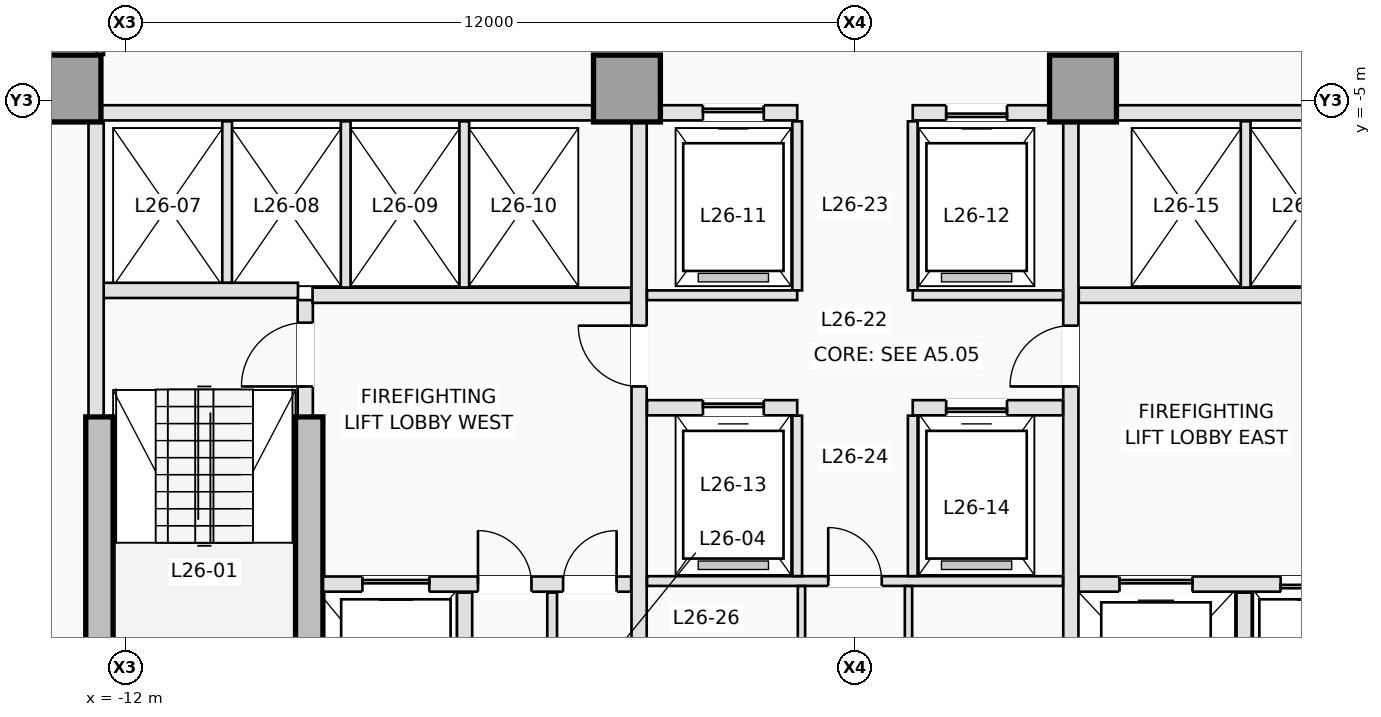
"""IFC4 building model, lengths in metres.
Left out: names, types, materials, properties, quantities, classifications, styles, units other than length and angle.
Written with IfcOpenShell. Run it as: python <this file> out.ifc"""

import sys

from ifc_helpers import new_model, si_unit, direction, frame, frame_2d, origin, origin_2d, place, context, subcontext, project, spatial, rectangle, extrude, element, fill, save


model = new_model("IFC4")
c1 = context("Model", 3, precision=1e-05, world=origin(), true_north=direction((0.0, 1.0)))
c2 = subcontext(c1, "Body", "Model", "MODEL_VIEW")
j1 = project(units=[si_unit("LENGTHUNIT", "METRE"), si_unit("PLANEANGLEUNIT", "RADIAN")], contexts=[c1])
p1 = place(None, origin())
s1 = spatial("IfcSite", under=j1, at=p1, CompositionType="ELEMENT")
p2 = place(p1, origin())
s2 = spatial("IfcBuilding", under=s1, at=p2, CompositionType="ELEMENT")
p3 = place(p2, frame((0.0, 0.0, 98.5)))
s3 = spatial("IfcBuildingStorey", under=s2, at=p3, CompositionType="ELEMENT", Elevation=98.5)
p4 = place(p3, frame((-12.425, -15.725, 0.0), z_axis=(0.0, 0.0, 1.0), x_axis=(0.0, 1.0, 0.0)))
e1 = element("IfcWall", 1, at=p4, inside=s3, PredefinedType="SHEAR", context=c2, shape_type="SweptSolid", body=[
    extrude(rectangle(XDim=5.525, YDim=0.45, at=frame_2d((2.763, 0.0))), origin(), (0.0, 0.0, 1.0), 3.5),
])
p5 = place(p3, frame((-8.975, -16.15, 0.0), z_axis=(0.0, 0.0, 1.0), x_axis=(0.0, 1.0, 0.0)))
e2 = element("IfcWall", 2, at=p5, inside=s3, PredefinedType="SHEAR", context=c2, shape_type="SweptSolid", body=[
    extrude(rectangle(XDim=5.95, YDim=0.45, at=frame_2d((2.975, 0.0))), origin(), (0.0, 0.0, 1.0), 3.5),
])
for number, where, z_axis, x_axis in (
    (3, (-12.95, -4.8, 0.0), (0.0, 0.0, 1.0), (1.0, 0.0, 0.0)),
    (4, (-3.75, -4.8, 0.0), (0.0, 0.0, 1.0), (1.0, 0.0, 0.0)),
    (5, (3.75, -4.8, 0.0), (0.0, 0.0, 1.0), (1.0, 0.0, 0.0)),
):
    element("IfcColumn", number, at=place(p3, frame(where, z_axis=z_axis, x_axis=x_axis)), inside=s3, PredefinedType="COLUMN", context=c2, shape_type="SweptSolid", body=[
        extrude(rectangle(XDim=1.1, YDim=1.1, at=origin_2d()), origin(), (0.0, 0.0, 1.0), 3.5),
    ])
p6 = place(p3, frame((-9.04, -10.18, 0.0), z_axis=(0.0, 0.0, 1.0), x_axis=(0.0, 1.0, 0.0)))
e6 = element("IfcWall", 6, at=p6, inside=s3, PredefinedType="PARTITIONING", context=c2, shape_type="SweptSolid", body=[
    extrude(rectangle(XDim=1.9, YDim=0.25, at=frame_2d((0.95, 0.0))), origin(), (0.0, 0.0, 1.0), 3.25),
])
p7 = place(p6, frame((0.48, 0.0, 0.0)))
e7 = element("IfcOpeningElement", 7, at=p7, cuts=e6, PredefinedType="OPENING", context=c2, shape_type="SweptSolid", body=[
    extrude(rectangle(XDim=1.05, YDim=2.15, at=frame_2d((0.525, 1.075))), frame((0.0, 0.135, 0.0), z_axis=(0.0, -1.0, 0.0), x_axis=(1.0, 0.0, 0.0)), (0.0, 0.0, 1.0), 0.27),
])
p8 = place(p3, frame((-12.38, -8.12, 0.0), z_axis=(0.0, 0.0, 1.0), x_axis=(1.0, 0.0, 0.0)))
e8 = element("IfcWall", 8, at=p8, inside=s3, PredefinedType="PARTITIONING", context=c2, shape_type="SweptSolid", body=[
    extrude(rectangle(XDim=3.22, YDim=0.25, at=frame_2d((1.61, 0.0))), origin(), (0.0, 0.0, 1.0), 3.25),
])
p9 = place(p3, frame((-12.48, -10.18, 0.0), z_axis=(0.0, 0.0, 1.0), x_axis=(0.0, 1.0, 0.0)))
e9 = element("IfcWall", 9, at=p9, inside=s3, PredefinedType="PARTITIONING", context=c2, shape_type="SweptSolid", body=[
    extrude(rectangle(XDim=4.828, YDim=0.25, at=frame_2d((2.414, 0.0))), origin(), (0.0, 0.0, 1.0), 3.25),
])
p10 = place(p3, frame((-8.748, -12.95, 0.0), z_axis=(0.0, 0.0, 1.0), x_axis=(1.0, 0.0, 0.0)))
e10 = element("IfcWall", 10, at=p10, inside=s3, PredefinedType="PARTITIONING", context=c2, shape_type="SweptSolid", body=[
    extrude(rectangle(XDim=5.068, YDim=0.25, at=frame_2d((2.534, 0.0))), origin(), (0.0, 0.0, 1.0), 3.25),
])
p11 = place(p10, frame((0.648, 0.0, 0.0)))
e11 = element("IfcOpeningElement", 11, at=p11, cuts=e10, PredefinedType="OPENING", context=c2, shape_type="SweptSolid", body=[
    extrude(rectangle(XDim=1.1, YDim=2.15, at=frame_2d((0.55, 1.075))), frame((0.0, 0.135, 0.0), z_axis=(0.0, -1.0, 0.0), x_axis=(1.0, 0.0, 0.0)), (0.0, 0.0, 1.0), 0.27),
])
p12 = place(p10, frame((2.548, 0.0, 0.0)))
e12 = element("IfcOpeningElement", 12, at=p12, cuts=e10, PredefinedType="OPENING", context=c2, shape_type="SweptSolid", body=[
    extrude(rectangle(XDim=0.88, YDim=2.1, at=frame_2d((0.44, 1.05))), frame((0.0, 0.135, 0.0), z_axis=(0.0, -1.0, 0.0), x_axis=(1.0, 0.0, 0.0)), (0.0, 0.0, 1.0), 0.27),
])
p13 = place(p10, frame((3.948, 0.0, 0.0)))
e13 = element("IfcOpeningElement", 13, at=p13, cuts=e10, PredefinedType="OPENING", context=c2, shape_type="SweptSolid", body=[
    extrude(rectangle(XDim=0.88, YDim=2.1, at=frame_2d((0.44, 1.05))), frame((0.0, 0.135, 0.0), z_axis=(0.0, -1.0, 0.0), x_axis=(1.0, 0.0, 0.0)), (0.0, 0.0, 1.0), 0.27),
])
p14 = place(p3, frame((3.68, -12.95, 0.0), z_axis=(0.0, 0.0, 1.0), x_axis=(1.0, 0.0, 0.0)))
e14 = element("IfcWall", 14, at=p14, inside=s3, PredefinedType="PARTITIONING", context=c2, shape_type="SweptSolid", body=[
    extrude(rectangle(XDim=5.068, YDim=0.25, at=frame_2d((2.534, 0.0))), origin(), (0.0, 0.0, 1.0), 3.25),
])
p15 = place(p14, frame((3.32, 0.0, 0.0)))
e15 = element("IfcOpeningElement", 15, at=p15, cuts=e14, PredefinedType="OPENING", context=c2, shape_type="SweptSolid", body=[
    extrude(rectangle(XDim=1.1, YDim=2.15, at=frame_2d((0.55, 1.075))), frame((0.0, 0.135, 0.0), z_axis=(0.0, -1.0, 0.0), x_axis=(1.0, 0.0, 0.0)), (0.0, 0.0, 1.0), 0.27),
])
p16 = place(p14, frame((0.67, 0.0, 0.0)))
e16 = element("IfcOpeningElement", 16, at=p16, cuts=e14, PredefinedType="OPENING", context=c2, shape_type="SweptSolid", body=[
    extrude(rectangle(XDim=1.2, YDim=2.15, at=frame_2d((0.6, 1.075))), frame((0.0, 0.135, 0.0), z_axis=(0.0, -1.0, 0.0), x_axis=(1.0, 0.0, 0.0)), (0.0, 0.0, 1.0), 0.27),
])
p17 = place(p3, frame((-6.42, -15.92, 0.0), z_axis=(0.0, 0.0, 1.0), x_axis=(0.0, 1.0, 0.0)))
e17 = element("IfcWall", 17, at=p17, inside=s3, PredefinedType="PARTITIONING", context=c2, shape_type="SweptSolid", body=[
    extrude(rectangle(XDim=2.83, YDim=0.25, at=frame_2d((1.415, 0.0))), origin(), (0.0, 0.0, 1.0), 3.25),
])
p18 = place(p3, frame((-4.98, -15.92, 0.0), z_axis=(0.0, 0.0, 1.0), x_axis=(0.0, 1.0, 0.0)))
e18 = element("IfcWall", 18, at=p18, inside=s3, PredefinedType="PARTITIONING", context=c2, shape_type="SweptSolid", body=[
    extrude(rectangle(XDim=2.83, YDim=0.16, at=frame_2d((1.415, 0.0))), origin(), (0.0, 0.0, 1.0), 3.25),
])
p19 = place(p3, frame((6.4, -15.92, 0.0), z_axis=(0.0, 0.0, 1.0), x_axis=(0.0, 1.0, 0.0)))
e19 = element("IfcWall", 19, at=p19, inside=s3, PredefinedType="PARTITIONING", context=c2, shape_type="SweptSolid", body=[
    extrude(rectangle(XDim=2.83, YDim=0.25, at=frame_2d((1.415, 0.0))), origin(), (0.0, 0.0, 1.0), 3.25),
])
for number, where, z_axis, x_axis in (
    (20, (-8.92, -8.2, 0.0), (0.0, 0.0, 1.0), (1.0, 0.0, 0.0)),
    (21, (3.68, -8.2, 0.0), (0.0, 0.0, 1.0), (1.0, 0.0, 0.0)),
):
    element("IfcWall", number, at=place(p3, frame(where, z_axis=z_axis, x_axis=x_axis)), inside=s3, PredefinedType="PARTITIONING", context=c2, shape_type="SweptSolid", body=[
        extrude(rectangle(XDim=5.24, YDim=0.25, at=frame_2d((2.62, 0.0))), origin(), (0.0, 0.0, 1.0), 3.25),
    ])
p20 = place(p3, frame((-3.55, -15.798, 0.0), z_axis=(0.0, 0.0, 1.0), x_axis=(0.0, 1.0, 0.0)))
e22 = element("IfcWall", 22, at=p20, inside=s3, PredefinedType="PARTITIONING", context=c2, shape_type="SweptSolid", body=[
    extrude(rectangle(XDim=10.446, YDim=0.25, at=frame_2d((5.223, 0.0))), origin(), (0.0, 0.0, 1.0), 3.25),
])
p21 = place(p20, frame((6.098, 0.0, 0.0)))
e23 = element("IfcOpeningElement", 23, at=p21, cuts=e22, PredefinedType="OPENING", context=c2, shape_type="SweptSolid", body=[
    extrude(rectangle(XDim=1.0, YDim=2.15, at=frame_2d((0.5, 1.075))), frame((0.0, 0.135, 0.0), z_axis=(0.0, -1.0, 0.0), x_axis=(1.0, 0.0, 0.0)), (0.0, 0.0, 1.0), 0.27),
])
p22 = place(p3, frame((3.55, -15.798, 0.0), z_axis=(0.0, 0.0, 1.0), x_axis=(0.0, 1.0, 0.0)))
e24 = element("IfcWall", 24, at=p22, inside=s3, PredefinedType="PARTITIONING", context=c2, shape_type="SweptSolid", body=[
    extrude(rectangle(XDim=10.446, YDim=0.25, at=frame_2d((5.223, 0.0))), origin(), (0.0, 0.0, 1.0), 3.25),
])
p23 = place(p22, frame((6.098, 0.0, 0.0)))
e25 = element("IfcOpeningElement", 25, at=p23, cuts=e24, PredefinedType="OPENING", context=c2, shape_type="SweptSolid", body=[
    extrude(rectangle(XDim=1.0, YDim=2.15, at=frame_2d((0.5, 1.075))), frame((0.0, 0.135, 0.0), z_axis=(0.0, -1.0, 0.0), x_axis=(1.0, 0.0, 0.0)), (0.0, 0.0, 1.0), 0.27),
])
for number, where, z_axis, x_axis in (
    (26, (-12.398, -5.2, 0.0), (0.0, 0.0, 1.0), (1.0, 0.0, 0.0)),
    (27, (4.302, -5.2, 0.0), (0.0, 0.0, 1.0), (1.0, 0.0, 0.0)),
):
    element("IfcWall", number, at=place(p3, frame(where, z_axis=z_axis, x_axis=x_axis)), inside=s3, PredefinedType="PARTITIONING", context=c2, shape_type="SweptSolid", body=[
        extrude(rectangle(XDim=8.096, YDim=0.25, at=frame_2d((4.048, 0.0))), origin(), (0.0, 0.0, 1.0), 3.25),
    ])
p24 = place(p3, frame((-3.198, -5.2, 0.0), z_axis=(0.0, 0.0, 1.0), x_axis=(1.0, 0.0, 0.0)))
e28 = element("IfcWall", 28, at=p24, inside=s3, PredefinedType="PARTITIONING", context=c2, shape_type="SweptSolid", body=[
    extrude(rectangle(XDim=2.248, YDim=0.25, at=frame_2d((1.124, 0.0))), origin(), (0.0, 0.0, 1.0), 3.25),
])
p25 = place(p24, frame((0.698, 0.0, 0.0)))
e29 = element("IfcOpeningElement", 29, at=p25, cuts=e28, PredefinedType="OPENING", context=c2, shape_type="SweptSolid", body=[
    extrude(rectangle(XDim=1.0, YDim=2.15, at=frame_2d((0.5, 1.075))), frame((0.0, 0.135, 0.0), z_axis=(0.0, -1.0, 0.0), x_axis=(1.0, 0.0, 0.0)), (0.0, 0.0, 1.0), 0.27),
])
p26 = place(p3, frame((0.95, -5.2, 0.0), z_axis=(0.0, 0.0, 1.0), x_axis=(1.0, 0.0, 0.0)))
e30 = element("IfcWall", 30, at=p26, inside=s3, PredefinedType="PARTITIONING", context=c2, shape_type="SweptSolid", body=[
    extrude(rectangle(XDim=2.248, YDim=0.25, at=frame_2d((1.124, 0.0))), origin(), (0.0, 0.0, 1.0), 3.25),
])
p27 = place(p26, frame((0.55, 0.0, 0.0)))
e31 = element("IfcOpeningElement", 31, at=p27, cuts=e30, PredefinedType="OPENING", context=c2, shape_type="SweptSolid", body=[
    extrude(rectangle(XDim=1.0, YDim=2.15, at=frame_2d((0.5, 1.075))), frame((0.0, 0.135, 0.0), z_axis=(0.0, -1.0, 0.0), x_axis=(1.0, 0.0, 0.0)), (0.0, 0.0, 1.0), 0.27),
])
p28 = place(p3, frame((-10.325, -7.993, 0.0), z_axis=(0.0, 0.0, 1.0), x_axis=(0.0, 1.0, 0.0)))
e32 = element("IfcWall", 32, at=p28, inside=s3, PredefinedType="PARTITIONING", context=c2, shape_type="SweptSolid", body=[
    extrude(rectangle(XDim=2.653, YDim=0.16, at=frame_2d((1.326, 0.0))), origin(), (0.0, 0.0, 1.0), 3.25),
])
for number, where, z_axis, x_axis in (
    (33, (-8.375, -8.073, 0.0), (0.0, 0.0, 1.0), (0.0, 1.0, 0.0)),
    (34, (-6.425, -8.073, 0.0), (0.0, 0.0, 1.0), (0.0, 1.0, 0.0)),
    (35, (6.425, -8.073, 0.0), (0.0, 0.0, 1.0), (0.0, 1.0, 0.0)),
):
    element("IfcWall", number, at=place(p3, frame(where, z_axis=z_axis, x_axis=x_axis)), inside=s3, PredefinedType="PARTITIONING", context=c2, shape_type="SweptSolid", body=[
        extrude(rectangle(XDim=2.733, YDim=0.16, at=frame_2d((1.366, 0.0))), origin(), (0.0, 0.0, 1.0), 3.25),
    ])
for number, where, z_axis, x_axis in (
    (36, (-0.95, -8.12, 0.0), (0.0, 0.0, 1.0), (0.0, 1.0, 0.0)),
    (37, (0.95, -8.12, 0.0), (0.0, 0.0, 1.0), (0.0, 1.0, 0.0)),
):
    element("IfcWall", number, at=place(p3, frame(where, z_axis=z_axis, x_axis=x_axis)), inside=s3, PredefinedType="PARTITIONING", context=c2, shape_type="SweptSolid", body=[
        extrude(rectangle(XDim=2.78, YDim=0.16, at=frame_2d((1.39, 0.0))), origin(), (0.0, 0.0, 1.0), 3.25),
    ])
for number, where, z_axis, x_axis in (
    (38, (-3.42, -8.2, 0.0), (0.0, 0.0, 1.0), (1.0, 0.0, 0.0)),
    (39, (0.95, -8.2, 0.0), (0.0, 0.0, 1.0), (1.0, 0.0, 0.0)),
):
    element("IfcWall", number, at=place(p3, frame(where, z_axis=z_axis, x_axis=x_axis)), inside=s3, PredefinedType="PARTITIONING", context=c2, shape_type="SweptSolid", body=[
        extrude(rectangle(XDim=2.47, YDim=0.16, at=frame_2d((1.235, 0.0))), origin(), (0.0, 0.0, 1.0), 3.25),
    ])
p29 = place(p3, frame((-3.42, -10.05, 0.0), z_axis=(0.0, 0.0, 1.0), x_axis=(1.0, 0.0, 0.0)))
e40 = element("IfcWall", 40, at=p29, inside=s3, PredefinedType="PARTITIONING", context=c2, shape_type="SweptSolid", body=[
    extrude(rectangle(XDim=2.47, YDim=0.25, at=frame_2d((1.235, 0.0))), origin(), (0.0, 0.0, 1.0), 3.25),
])
p30 = place(p29, frame((0.92, 0.0, 0.0)))
e41 = element("IfcOpeningElement", 41, at=p30, cuts=e40, PredefinedType="OPENING", context=c2, shape_type="SweptSolid", body=[
    extrude(rectangle(XDim=1.0, YDim=2.15, at=frame_2d((0.5, 1.075))), frame((0.0, 0.135, 0.0), z_axis=(0.0, -1.0, 0.0), x_axis=(1.0, 0.0, 0.0)), (0.0, 0.0, 1.0), 0.27),
])
p31 = place(p3, frame((0.95, -10.05, 0.0), z_axis=(0.0, 0.0, 1.0), x_axis=(1.0, 0.0, 0.0)))
e42 = element("IfcWall", 42, at=p31, inside=s3, PredefinedType="PARTITIONING", context=c2, shape_type="SweptSolid", body=[
    extrude(rectangle(XDim=2.47, YDim=0.25, at=frame_2d((1.235, 0.0))), origin(), (0.0, 0.0, 1.0), 3.25),
])
p32 = place(p31, frame((0.55, 0.0, 0.0)))
e43 = element("IfcOpeningElement", 43, at=p32, cuts=e42, PredefinedType="OPENING", context=c2, shape_type="SweptSolid", body=[
    extrude(rectangle(XDim=1.0, YDim=2.15, at=frame_2d((0.5, 1.075))), frame((0.0, 0.135, 0.0), z_axis=(0.0, -1.0, 0.0), x_axis=(1.0, 0.0, 0.0)), (0.0, 0.0, 1.0), 0.27),
])
p33 = place(p3, frame((-3.42, -12.9, 0.0), z_axis=(0.0, 0.0, 1.0), x_axis=(1.0, 0.0, 0.0)))
e44 = element("IfcWall", 44, at=p33, inside=s3, PredefinedType="PARTITIONING", context=c2, shape_type="SweptSolid", body=[
    extrude(rectangle(XDim=6.84, YDim=0.16, at=frame_2d((3.42, 0.0))), origin(), (0.0, 0.0, 1.0), 3.25),
])
p34 = place(p33, frame((2.98, 0.0, 0.0)))
e45 = element("IfcOpeningElement", 45, at=p34, cuts=e44, PredefinedType="OPENING", context=c2, shape_type="SweptSolid", body=[
    extrude(rectangle(XDim=0.88, YDim=2.12, at=frame_2d((0.44, 1.06))), frame((0.0, 0.09, 0.0), z_axis=(0.0, -1.0, 0.0), x_axis=(1.0, 0.0, 0.0)), (0.0, 0.0, 1.0), 0.18),
])
for number, where, z_axis, x_axis in (
    (46, (-0.95, -12.818, 0.0), (0.0, 0.0, 1.0), (0.0, 1.0, 0.0)),
    (47, (0.95, -12.818, 0.0), (0.0, 0.0, 1.0), (0.0, 1.0, 0.0)),
):
    element("IfcWall", number, at=place(p3, frame(where, z_axis=z_axis, x_axis=x_axis)), inside=s3, PredefinedType="PARTITIONING", context=c2, shape_type="SweptSolid", body=[
        extrude(rectangle(XDim=2.638, YDim=0.16, at=frame_2d((1.319, 0.0))), origin(), (0.0, 0.0, 1.0), 3.25),
    ])
p35 = place(p3, frame((-0.88, -16.02, 0.0), z_axis=(0.0, 0.0, 1.0), x_axis=(0.0, 1.0, 0.0)))
e48 = element("IfcWall", 48, at=p35, inside=s3, PredefinedType="PARTITIONING", context=c2, shape_type="SweptSolid", body=[
    extrude(rectangle(XDim=3.038, YDim=0.12, at=frame_2d((1.519, 0.0))), origin(), (0.0, 0.0, 1.0), 3.25),
])
p36 = place(p35, frame((1.05, 0.0, 0.0)))
e49 = element("IfcOpeningElement", 49, at=p36, cuts=e48, PredefinedType="OPENING", context=c2, shape_type="SweptSolid", body=[
    extrude(rectangle(XDim=0.88, YDim=2.12, at=frame_2d((0.44, 1.06))), frame((0.0, 0.07, 0.0), z_axis=(0.0, -1.0, 0.0), x_axis=(1.0, 0.0, 0.0)), (0.0, 0.0, 1.0), 0.14),
])
p37 = place(p3, frame((0.88, -16.02, 0.0), z_axis=(0.0, 0.0, 1.0), x_axis=(0.0, 1.0, 0.0)))
e50 = element("IfcWall", 50, at=p37, inside=s3, PredefinedType="PARTITIONING", context=c2, shape_type="SweptSolid", body=[
    extrude(rectangle(XDim=3.038, YDim=0.12, at=frame_2d((1.519, 0.0))), origin(), (0.0, 0.0, 1.0), 3.25),
])
p38 = place(p37, frame((1.05, 0.0, 0.0)))
e51 = element("IfcOpeningElement", 51, at=p38, cuts=e50, PredefinedType="OPENING", context=c2, shape_type="SweptSolid", body=[
    extrude(rectangle(XDim=0.88, YDim=2.12, at=frame_2d((0.44, 1.06))), frame((0.0, 0.07, 0.0), z_axis=(0.0, -1.0, 0.0), x_axis=(1.0, 0.0, 0.0)), (0.0, 0.0, 1.0), 0.14),
])
p39 = place(p3, frame((-12.41, -4.248, 0.0), z_axis=(0.0, 0.0, 1.0), x_axis=(0.0, 1.0, 0.0)))
e52 = element("IfcWall", 52, at=p39, inside=s3, PredefinedType="PARTITIONING", context=c2, shape_type="SweptSolid", body=[
    extrude(rectangle(XDim=1.848, YDim=0.12, at=frame_2d((0.924, 0.0))), origin(), (0.0, 0.0, 1.0), 3.25),
])
p40 = place(p25, origin())
e53 = element("IfcDoor", 53, at=p40, inside=s3, OperationType="SLIDING_TO_LEFT", PredefinedType="DOOR", context=c2, shape_type="SweptSolid", body=[
    extrude(rectangle(XDim=1.0, YDim=2.15, at=frame_2d((0.5, 1.075))), frame((0.0, 0.025, 0.0), z_axis=(0.0, -1.0, 0.0), x_axis=(1.0, 0.0, 0.0)), (0.0, 0.0, 1.0), 0.05),
])
fill(e29, e53)
p41 = place(p27, origin())
e54 = element("IfcDoor", 54, at=p41, inside=s3, OperationType="SLIDING_TO_RIGHT", PredefinedType="DOOR", context=c2, shape_type="SweptSolid", body=[
    extrude(rectangle(XDim=1.0, YDim=2.15, at=frame_2d((0.5, 1.075))), frame((0.0, 0.025, 0.0), z_axis=(0.0, -1.0, 0.0), x_axis=(1.0, 0.0, 0.0)), (0.0, 0.0, 1.0), 0.05),
])
fill(e31, e54)
p42 = place(p11, origin())
e55 = element("IfcDoor", 55, at=p42, inside=s3, OperationType="SLIDING_TO_LEFT", PredefinedType="DOOR", context=c2, shape_type="SweptSolid", body=[
    extrude(rectangle(XDim=1.1, YDim=2.15, at=frame_2d((0.55, 1.075))), frame((0.0, 0.025, 0.0), z_axis=(0.0, -1.0, 0.0), x_axis=(1.0, 0.0, 0.0)), (0.0, 0.0, 1.0), 0.05),
])
fill(e11, e55)
p43 = place(p15, origin())
e56 = element("IfcDoor", 56, at=p43, inside=s3, OperationType="SLIDING_TO_RIGHT", PredefinedType="DOOR", context=c2, shape_type="SweptSolid", body=[
    extrude(rectangle(XDim=1.1, YDim=2.15, at=frame_2d((0.55, 1.075))), frame((0.0, 0.025, 0.0), z_axis=(0.0, -1.0, 0.0), x_axis=(1.0, 0.0, 0.0)), (0.0, 0.0, 1.0), 0.05),
])
fill(e15, e56)
p44 = place(p16, origin())
e57 = element("IfcDoor", 57, at=p44, inside=s3, OperationType="SLIDING_TO_LEFT", PredefinedType="DOOR", context=c2, shape_type="SweptSolid", body=[
    extrude(rectangle(XDim=1.2, YDim=2.15, at=frame_2d((0.6, 1.075))), frame((0.0, 0.025, 0.0), z_axis=(0.0, -1.0, 0.0), x_axis=(1.0, 0.0, 0.0)), (0.0, 0.0, 1.0), 0.05),
])
fill(e16, e57)
p45 = place(p30, origin())
e58 = element("IfcDoor", 58, at=p45, inside=s3, OperationType="SLIDING_TO_LEFT", PredefinedType="DOOR", context=c2, shape_type="SweptSolid", body=[
    extrude(rectangle(XDim=1.0, YDim=2.15, at=frame_2d((0.5, 1.075))), frame((0.0, 0.025, 0.0), z_axis=(0.0, -1.0, 0.0), x_axis=(1.0, 0.0, 0.0)), (0.0, 0.0, 1.0), 0.05),
])
fill(e41, e58)
p46 = place(p32, origin())
e59 = element("IfcDoor", 59, at=p46, inside=s3, OperationType="SLIDING_TO_RIGHT", PredefinedType="DOOR", context=c2, shape_type="SweptSolid", body=[
    extrude(rectangle(XDim=1.0, YDim=2.15, at=frame_2d((0.5, 1.075))), frame((0.0, 0.025, 0.0), z_axis=(0.0, -1.0, 0.0), x_axis=(1.0, 0.0, 0.0)), (0.0, 0.0, 1.0), 0.05),
])
fill(e43, e59)
p47 = place(p7, origin())
e60 = element("IfcDoor", 60, at=p47, inside=s3, OperationType="SINGLE_SWING_LEFT", PredefinedType="DOOR", context=c2, shape_type="SweptSolid", body=[
    extrude(rectangle(XDim=1.05, YDim=2.15, at=frame_2d((0.525, 1.075))), frame((0.0, 0.025, 0.0), z_axis=(0.0, -1.0, 0.0), x_axis=(1.0, 0.0, 0.0)), (0.0, 0.0, 1.0), 0.05),
])
fill(e7, e60)
p48 = place(p12, origin())
e61 = element("IfcDoor", 61, at=p48, inside=s3, OperationType="SINGLE_SWING_LEFT", PredefinedType="TRAPDOOR", context=c2, shape_type="SweptSolid", body=[
    extrude(rectangle(XDim=0.88, YDim=2.1, at=frame_2d((0.44, 1.05))), frame((0.0, 0.025, 0.0), z_axis=(0.0, -1.0, 0.0), x_axis=(1.0, 0.0, 0.0)), (0.0, 0.0, 1.0), 0.05),
])
fill(e12, e61)
p49 = place(p13, origin())
e62 = element("IfcDoor", 62, at=p49, inside=s3, OperationType="SINGLE_SWING_RIGHT", PredefinedType="TRAPDOOR", context=c2, shape_type="SweptSolid", body=[
    extrude(rectangle(XDim=0.88, YDim=2.1, at=frame_2d((0.44, 1.05))), frame((0.0, 0.025, 0.0), z_axis=(0.0, -1.0, 0.0), x_axis=(1.0, 0.0, 0.0)), (0.0, 0.0, 1.0), 0.05),
])
fill(e13, e62)
p50 = place(p21, origin())
e63 = element("IfcDoor", 63, at=p50, inside=s3, OperationType="SINGLE_SWING_RIGHT", PredefinedType="DOOR", context=c2, shape_type="SweptSolid", body=[
    extrude(rectangle(XDim=1.0, YDim=2.15, at=frame_2d((0.5, 1.075))), frame((0.0, 0.025, 0.0), z_axis=(0.0, -1.0, 0.0), x_axis=(1.0, 0.0, 0.0)), (0.0, 0.0, 1.0), 0.05),
])
fill(e23, e63)
p51 = place(p23, origin())
e64 = element("IfcDoor", 64, at=p51, inside=s3, OperationType="SINGLE_SWING_LEFT", PredefinedType="DOOR", context=c2, shape_type="SweptSolid", body=[
    extrude(rectangle(XDim=1.0, YDim=2.15, at=frame_2d((0.5, 1.075))), frame((0.0, 0.025, 0.0), z_axis=(0.0, -1.0, 0.0), x_axis=(1.0, 0.0, 0.0)), (0.0, 0.0, 1.0), 0.05),
])
fill(e25, e64)
p52 = place(p34, origin())
e65 = element("IfcDoor", 65, at=p52, inside=s3, OperationType="SINGLE_SWING_LEFT", PredefinedType="DOOR", context=c2, shape_type="SweptSolid", body=[
    extrude(rectangle(XDim=0.88, YDim=2.12, at=frame_2d((0.44, 1.06))), frame((0.0, 0.025, 0.0), z_axis=(0.0, -1.0, 0.0), x_axis=(1.0, 0.0, 0.0)), (0.0, 0.0, 1.0), 0.05),
])
fill(e45, e65)
save(model, sys.argv[1])
